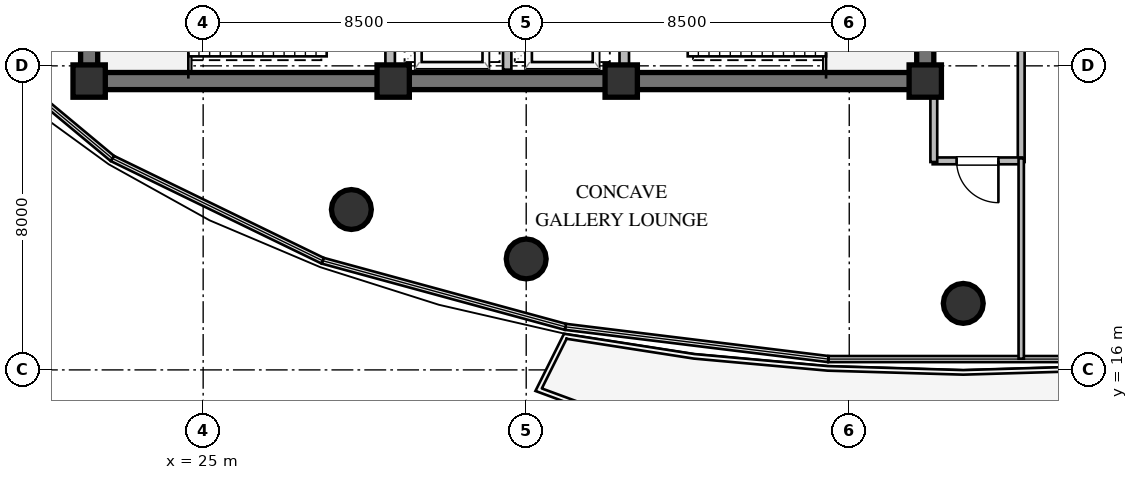
"""IFC4 building model, lengths in metres.
Left out: names, types, materials, properties, quantities, classifications, styles, units other than length and angle.
Written with IfcOpenShell. Run it as: python <this file> out.ifc"""

import sys

from ifc_helpers import new_model, si_unit, direction, frame, frame_2d, origin, origin_2d, place, context, subcontext, project, spatial, rectangle, circle, extrude, element, fill, save


model = new_model("IFC4")
c1 = context("Model", 3, precision=1e-05, world=origin(), true_north=direction((0.0, 1.0)))
c2 = subcontext(c1, "Body", "Model", "MODEL_VIEW")
j1 = project(units=[si_unit("LENGTHUNIT", "METRE"), si_unit("PLANEANGLEUNIT", "RADIAN")], contexts=[c1])
p1 = place(None, origin())
s1 = spatial("IfcSite", under=j1, at=p1, CompositionType="ELEMENT")
p2 = place(p1, origin())
s2 = spatial("IfcBuilding", under=s1, at=p2, CompositionType="ELEMENT")
p3 = place(p2, frame((0.0, 0.0, 190.8)))
s3 = spatial("IfcBuildingStorey", under=s2, at=p3, CompositionType="ELEMENT", Elevation=190.8)
p4 = place(p3, frame((21.775, 23.6, 0.0), z_axis=(0.0, 0.0, 1.0), x_axis=(1.0, 0.0, 0.0)))
e1 = element("IfcWall", 1, at=p4, inside=s3, PredefinedType="SHEAR", context=c2, shape_type="SweptSolid", body=[
    extrude(rectangle(XDim=22.45, YDim=0.45, at=frame_2d((11.225, 0.0))), origin(), (0.0, 0.0, 1.0), 4.56),
])
p5 = place(p3, frame((22.0, 23.825, 0.0), z_axis=(0.0, 0.0, 1.0), x_axis=(0.0, 1.0, 0.0)))
e2 = element("IfcWall", 2, at=p5, inside=s3, PredefinedType="SHEAR", context=c2, shape_type="SweptSolid", body=[
    extrude(rectangle(XDim=12.35, YDim=0.45, at=frame_2d((6.175, 0.0))), origin(), (0.0, 0.0, 1.0), 4.56),
])
p6 = place(p3, frame((44.0, 23.825, 0.0), z_axis=(0.0, 0.0, 1.0), x_axis=(0.0, 1.0, 0.0)))
e3 = element("IfcWall", 3, at=p6, inside=s3, PredefinedType="SHEAR", context=c2, shape_type="SweptSolid", body=[
    extrude(rectangle(XDim=12.35, YDim=0.45, at=frame_2d((6.175, 0.0))), origin(), (0.0, 0.0, 1.0), 4.56),
])
p7 = place(p6, frame((8.675, 0.0, 0.0)))
e4 = element("IfcOpeningElement", 4, at=p7, cuts=e3, PredefinedType="OPENING", context=c2, shape_type="SweptSolid", body=[
    extrude(rectangle(XDim=1.5, YDim=2.15, at=frame_2d((0.75, 1.075))), frame((0.0, 0.235, 0.0), z_axis=(0.0, -1.0, 0.0), x_axis=(1.0, 0.0, 0.0)), (0.0, 0.0, 1.0), 0.47),
])
for number, where, z_axis, x_axis in (
    (5, (22.0, 23.6, 0.0), (0.0, 0.0, 1.0), (1.0, 0.0, 0.0)),
    (6, (30.0, 23.6, 0.0), (0.0, 0.0, 1.0), (1.0, 0.0, 0.0)),
    (7, (36.0, 23.6, 0.0), (0.0, 0.0, 1.0), (1.0, 0.0, 0.0)),
    (8, (44.0, 23.6, 0.0), (0.0, 0.0, 1.0), (1.0, 0.0, 0.0)),
):
    element("IfcColumn", number, at=place(p3, frame(where, z_axis=z_axis, x_axis=x_axis)), inside=s3, PredefinedType="COLUMN", context=c2, shape_type="SweptSolid", body=[
        extrude(rectangle(XDim=0.85, YDim=0.85, at=origin_2d()), origin(), (0.0, 0.0, 1.0), 4.8),
    ])
for number, where, z_axis, x_axis in (
    (9, (28.9, 20.22, 0.0), (0.0, 0.0, 1.0), (1.0, 0.0, 0.0)),
    (10, (33.5, 18.92, 0.0), (0.0, 0.0, 1.0), (1.0, 0.0, 0.0)),
    (11, (45.0, 17.75, 0.0), (0.0, 0.0, 1.0), (1.0, 0.0, 0.0)),
):
    element("IfcColumn", number, at=place(p3, frame(where, z_axis=z_axis, x_axis=x_axis)), inside=s3, PredefinedType="COLUMN", context=c2, shape_type="SweptSolid", body=[
        extrude(circle(Radius=0.525, at=origin_2d()), origin(), (0.0, 0.0, 1.0), 4.8),
    ])
p8 = place(p3, frame((29.92, 23.9, 0.0), z_axis=(0.0, 0.0, 1.0), x_axis=(0.0, 1.0, 0.0)))
e12 = element("IfcWall", 12, at=p8, inside=s3, PredefinedType="SOLIDWALL", context=c2, shape_type="SweptSolid", body=[
    extrude(rectangle(XDim=5.4, YDim=0.25, at=frame_2d((2.7, 0.0))), origin(), (0.0, 0.0, 1.0), 4.56),
])
p9 = place(p8, frame((3.421, 0.0, 0.0)))
e13 = element("IfcOpeningElement", 13, at=p9, cuts=e12, PredefinedType="OPENING", context=c2, shape_type="SweptSolid", body=[
    extrude(rectangle(XDim=1.15, YDim=2.1, at=frame_2d((0.575, 1.05))), frame((0.0, 0.135, 0.0), z_axis=(0.0, -1.0, 0.0), x_axis=(1.0, 0.0, 0.0)), (0.0, 0.0, 1.0), 0.27),
])
p10 = place(p3, frame((36.08, 23.9, 0.0), z_axis=(0.0, 0.0, 1.0), x_axis=(0.0, 1.0, 0.0)))
e14 = element("IfcWall", 14, at=p10, inside=s3, PredefinedType="SOLIDWALL", context=c2, shape_type="SweptSolid", body=[
    extrude(rectangle(XDim=5.4, YDim=0.25, at=frame_2d((2.7, 0.0))), origin(), (0.0, 0.0, 1.0), 4.56),
])
p11 = place(p10, frame((3.421, 0.0, 0.0)))
e15 = element("IfcOpeningElement", 15, at=p11, cuts=e14, PredefinedType="OPENING", context=c2, shape_type="SweptSolid", body=[
    extrude(rectangle(XDim=1.15, YDim=2.1, at=frame_2d((0.575, 1.05))), frame((0.0, 0.135, 0.0), z_axis=(0.0, -1.0, 0.0), x_axis=(1.0, 0.0, 0.0)), (0.0, 0.0, 1.0), 0.27),
])
p12 = place(p3, frame((33.0, 23.9, 0.0), z_axis=(0.0, 0.0, 1.0), x_axis=(0.0, 1.0, 0.0)))
e16 = element("IfcWall", 16, at=p12, inside=s3, PredefinedType="SOLIDWALL", context=c2, shape_type="SweptSolid", body=[
    extrude(rectangle(XDim=2.72, YDim=0.22, at=frame_2d((1.36, 0.0))), origin(), (0.0, 0.0, 1.0), 4.56),
])
p13 = place(p3, frame((46.525, 29.565, 0.0), z_axis=(0.0, 0.0, 1.0), x_axis=(0.0, -1.0, 0.0)))
e17 = element("IfcWall", 17, at=p13, inside=s3, PredefinedType="PARTITIONING", context=c2, shape_type="SweptSolid", body=[
    extrude(rectangle(XDim=8.095, YDim=0.18, at=frame_2d((4.047, 0.0))), origin(), (0.0, 0.0, 1.0), 4.56),
])
p14 = place(p13, frame((3.498, 0.0, 0.0)))
e18 = element("IfcOpeningElement", 18, at=p14, cuts=e17, PredefinedType="OPENING", context=c2, shape_type="SweptSolid", body=[
    extrude(rectangle(XDim=1.1, YDim=2.1, at=frame_2d((0.55, 1.05))), frame((0.0, 0.1, 0.0), z_axis=(0.0, -1.0, 0.0), x_axis=(1.0, 0.0, 0.0)), (0.0, 0.0, 1.0), 0.2),
])
p15 = place(p3, frame((46.555, 21.5, 0.0), z_axis=(0.0, 0.0, 1.0), x_axis=(-1.0, 0.0, 0.0)))
e19 = element("IfcWall", 19, at=p15, inside=s3, PredefinedType="PARTITIONING", context=c2, shape_type="SweptSolid", body=[
    extrude(rectangle(XDim=2.36, YDim=0.18, at=frame_2d((1.18, 0.0))), origin(), (0.0, 0.0, 1.0), 4.56),
])
p16 = place(p15, frame((0.63, 0.0, 0.0)))
e20 = element("IfcOpeningElement", 20, at=p16, cuts=e19, PredefinedType="OPENING", context=c2, shape_type="SweptSolid", body=[
    extrude(rectangle(XDim=1.1, YDim=2.1, at=frame_2d((0.55, 1.05))), frame((0.0, 0.1, 0.0), z_axis=(0.0, -1.0, 0.0), x_axis=(1.0, 0.0, 0.0)), (0.0, 0.0, 1.0), 0.2),
])
p17 = place(p3, frame((44.225, 21.47, 0.0), z_axis=(0.0, 0.0, 1.0), x_axis=(0.0, 1.0, 0.0)))
e21 = element("IfcWall", 21, at=p17, inside=s3, PredefinedType="PARTITIONING", context=c2, shape_type="SweptSolid", body=[
    extrude(rectangle(XDim=2.12, YDim=0.18, at=frame_2d((1.06, 0.0))), origin(), (0.0, 0.0, 1.0), 3.7),
])
p18 = place(p3, frame((46.525, 16.295, 0.0), z_axis=(0.0, 0.0, 1.0), x_axis=(0.0, 1.0, 0.0)))
e22 = element("IfcWall", 22, at=p18, inside=s3, PredefinedType="PARTITIONING", context=c2, shape_type="SweptSolid", body=[
    extrude(rectangle(XDim=5.27, YDim=0.14, at=frame_2d((2.635, 0.0))), origin(), (0.0, 0.0, 1.0), 4.56),
])
p19 = place(p16, origin())
e23 = element("IfcDoor", 23, at=p19, inside=s3, OperationType="SINGLE_SWING_LEFT", PredefinedType="DOOR", context=c2, shape_type="SweptSolid", body=[
    extrude(rectangle(XDim=1.1, YDim=2.1, at=frame_2d((0.55, 1.05))), frame((0.0, 0.025, 0.0), z_axis=(0.0, -1.0, 0.0), x_axis=(1.0, 0.0, 0.0)), (0.0, 0.0, 1.0), 0.05),
])
fill(e20, e23)
save(model, sys.argv[1])
